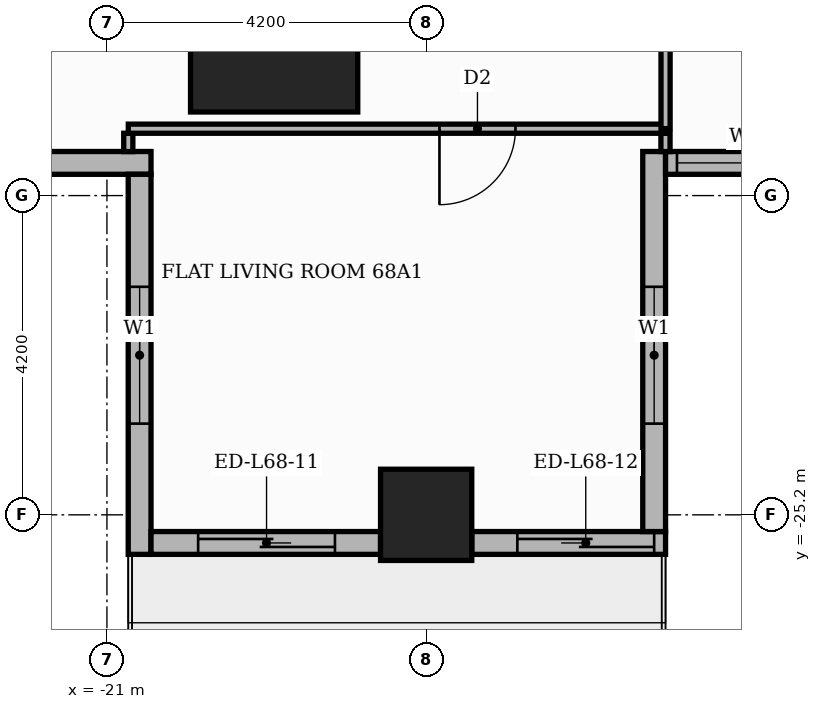
"""IFC4 building model, lengths in metres.
Left out: names, types, materials, properties, quantities, classifications, styles, units other than length and angle.
Written with IfcOpenShell. Run it as: python <this file> out.ifc"""

import sys

from ifc_helpers import new_model, si_unit, direction, frame, frame_2d, origin, origin_2d, place, context, subcontext, project, spatial, rectangle, extrude, element, fill, save


model = new_model("IFC4")
c1 = context("Model", 3, precision=1e-05, world=origin(), true_north=direction((0.0, 1.0)))
c2 = subcontext(c1, "Body", "Model", "MODEL_VIEW")
j1 = project(units=[si_unit("LENGTHUNIT", "METRE"), si_unit("PLANEANGLEUNIT", "RADIAN")], contexts=[c1])
p1 = place(None, origin())
s1 = spatial("IfcSite", under=j1, at=p1, CompositionType="ELEMENT")
p2 = place(p1, origin())
s2 = spatial("IfcBuilding", under=s1, at=p2, CompositionType="ELEMENT")
p3 = place(p2, frame((0.0, 0.0, 283.5)))
s3 = spatial("IfcBuildingStorey", under=s2, at=p3, CompositionType="ELEMENT", Elevation=283.5)
p4 = place(p3, frame((-18.8, -18.8, 0.0), z_axis=(0.0, 0.0, 1.0), x_axis=(1.0, 0.0, 0.0)))
e1 = element("IfcColumn", 1, at=p4, inside=s3, PredefinedType="COLUMN", context=c2, shape_type="SweptSolid", body=[
    extrude(rectangle(XDim=2.2, YDim=2.2, at=origin_2d()), origin(), (0.0, 0.0, 1.0), 3.9),
])
p5 = place(p3, frame((-16.8, -25.2, 0.0), z_axis=(0.0, 0.0, 1.0), x_axis=(1.0, 0.0, 0.0)))
e2 = element("IfcColumn", 2, at=p5, inside=s3, PredefinedType="COLUMN", context=c2, shape_type="SweptSolid", body=[
    extrude(rectangle(XDim=1.2, YDim=1.2, at=origin_2d()), origin(), (0.0, 0.0, 1.0), 3.9),
])
p6 = place(p3, frame((-25.42, -20.57, 0.0), z_axis=(0.0, 0.0, 1.0), x_axis=(1.0, 0.0, 0.0)))
e3 = element("IfcWall", 3, at=p6, inside=s3, PredefinedType="STANDARD", context=c2, shape_type="SweptSolid", body=[
    extrude(rectangle(XDim=5.0, YDim=0.3, at=frame_2d((2.5, 0.0))), origin(), (0.0, 0.0, 1.0), 3.4),
])
p7 = place(p6, frame((1.42, 0.0, 0.9)))
e4 = element("IfcOpeningElement", 4, at=p7, cuts=e3, PredefinedType="OPENING", context=c2, shape_type="SweptSolid", body=[
    extrude(rectangle(XDim=1.8, YDim=2.1, at=frame_2d((0.9, 1.05))), frame((0.0, 0.16, 0.0), z_axis=(0.0, -1.0, 0.0), x_axis=(1.0, 0.0, 0.0)), (0.0, 0.0, 1.0), 0.32),
])
p8 = place(p3, frame((-20.57, -20.72, 0.0), z_axis=(0.0, 0.0, 1.0), x_axis=(0.0, -1.0, 0.0)))
e5 = element("IfcWall", 5, at=p8, inside=s3, PredefinedType="STANDARD", context=c2, shape_type="SweptSolid", body=[
    extrude(rectangle(XDim=5.0, YDim=0.3, at=frame_2d((2.5, 0.0))), origin(), (0.0, 0.0, 1.0), 3.4),
])
p9 = place(p8, frame((1.48, 0.0, 0.9)))
e6 = element("IfcOpeningElement", 6, at=p9, cuts=e5, PredefinedType="OPENING", context=c2, shape_type="SweptSolid", body=[
    extrude(rectangle(XDim=1.8, YDim=2.1, at=frame_2d((0.9, 1.05))), frame((0.0, 0.16, 0.0), z_axis=(0.0, -1.0, 0.0), x_axis=(1.0, 0.0, 0.0)), (0.0, 0.0, 1.0), 0.32),
])
p10 = place(p3, frame((-20.42, -25.57, 0.0), z_axis=(0.0, 0.0, 1.0), x_axis=(1.0, 0.0, 0.0)))
e7 = element("IfcWall", 7, at=p10, inside=s3, PredefinedType="STANDARD", context=c2, shape_type="SweptSolid", body=[
    extrude(rectangle(XDim=3.02, YDim=0.3, at=frame_2d((1.51, 0.0))), origin(), (0.0, 0.0, 1.0), 3.4),
])
p11 = place(p10, frame((0.62, 0.0, 0.0)))
e8 = element("IfcOpeningElement", 8, at=p11, cuts=e7, PredefinedType="OPENING", context=c2, shape_type="SweptSolid", body=[
    extrude(rectangle(XDim=1.8, YDim=2.4, at=frame_2d((0.9, 1.2))), frame((0.0, 0.16, 0.0), z_axis=(0.0, -1.0, 0.0), x_axis=(1.0, 0.0, 0.0)), (0.0, 0.0, 1.0), 0.32),
])
p12 = place(p3, frame((-16.2, -25.57, 0.0), z_axis=(0.0, 0.0, 1.0), x_axis=(1.0, 0.0, 0.0)))
e9 = element("IfcWall", 9, at=p12, inside=s3, PredefinedType="STANDARD", context=c2, shape_type="SweptSolid", body=[
    extrude(rectangle(XDim=2.55, YDim=0.3, at=frame_2d((1.275, 0.0))), origin(), (0.0, 0.0, 1.0), 3.4),
])
p13 = place(p12, frame((0.6, 0.0, 0.0)))
e10 = element("IfcOpeningElement", 10, at=p13, cuts=e9, PredefinedType="OPENING", context=c2, shape_type="SweptSolid", body=[
    extrude(rectangle(XDim=1.8, YDim=2.4, at=frame_2d((0.9, 1.2))), frame((0.0, 0.16, 0.0), z_axis=(0.0, -1.0, 0.0), x_axis=(1.0, 0.0, 0.0)), (0.0, 0.0, 1.0), 0.32),
])
p14 = place(p3, frame((-13.8, -25.42, 0.0), z_axis=(0.0, 0.0, 1.0), x_axis=(0.0, 1.0, 0.0)))
e11 = element("IfcWall", 11, at=p14, inside=s3, PredefinedType="STANDARD", context=c2, shape_type="SweptSolid", body=[
    extrude(rectangle(XDim=5.0, YDim=0.3, at=frame_2d((2.5, 0.0))), origin(), (0.0, 0.0, 1.0), 3.4),
])
p15 = place(p14, frame((1.42, 0.0, 0.9)))
e12 = element("IfcOpeningElement", 12, at=p15, cuts=e11, PredefinedType="OPENING", context=c2, shape_type="SweptSolid", body=[
    extrude(rectangle(XDim=1.8, YDim=2.1, at=frame_2d((0.9, 1.05))), frame((0.0, 0.16, 0.0), z_axis=(0.0, -1.0, 0.0), x_axis=(1.0, 0.0, 0.0)), (0.0, 0.0, 1.0), 0.32),
])
p16 = place(p3, frame((-13.65, -20.57, 0.0), z_axis=(0.0, 0.0, 1.0), x_axis=(1.0, 0.0, 0.0)))
e13 = element("IfcWall", 13, at=p16, inside=s3, PredefinedType="STANDARD", context=c2, shape_type="SweptSolid", body=[
    extrude(rectangle(XDim=27.6, YDim=0.3, at=frame_2d((13.8, 0.0))), origin(), (0.0, 0.0, 1.0), 3.4),
])
p17 = place(p16, frame((0.15, 0.0, 0.9)))
e14 = element("IfcOpeningElement", 14, at=p17, cuts=e13, PredefinedType="OPENING", context=c2, shape_type="SweptSolid", body=[
    extrude(rectangle(XDim=1.8, YDim=2.1, at=frame_2d((0.9, 1.05))), frame((0.0, 0.16, 0.0), z_axis=(0.0, -1.0, 0.0), x_axis=(1.0, 0.0, 0.0)), (0.0, 0.0, 1.0), 0.32),
])
p18 = place(p16, frame((2.25, 0.0, 0.9)))
e15 = element("IfcOpeningElement", 15, at=p18, cuts=e13, PredefinedType="OPENING", context=c2, shape_type="SweptSolid", body=[
    extrude(rectangle(XDim=6.0, YDim=2.1, at=frame_2d((3.0, 1.05))), frame((0.0, 0.16, 0.0), z_axis=(0.0, -1.0, 0.0), x_axis=(1.0, 0.0, 0.0)), (0.0, 0.0, 1.0), 0.32),
])
p19 = place(p16, frame((8.55, 0.0, 0.9)))
e16 = element("IfcOpeningElement", 16, at=p19, cuts=e13, PredefinedType="OPENING", context=c2, shape_type="SweptSolid", body=[
    extrude(rectangle(XDim=6.0, YDim=2.1, at=frame_2d((3.0, 1.05))), frame((0.0, 0.16, 0.0), z_axis=(0.0, -1.0, 0.0), x_axis=(1.0, 0.0, 0.0)), (0.0, 0.0, 1.0), 0.32),
])
p20 = place(p16, frame((14.85, 0.0, 0.9)))
e17 = element("IfcOpeningElement", 17, at=p20, cuts=e13, PredefinedType="OPENING", context=c2, shape_type="SweptSolid", body=[
    extrude(rectangle(XDim=6.0, YDim=2.1, at=frame_2d((3.0, 1.05))), frame((0.0, 0.16, 0.0), z_axis=(0.0, -1.0, 0.0), x_axis=(1.0, 0.0, 0.0)), (0.0, 0.0, 1.0), 0.32),
])
p21 = place(p16, frame((21.15, 0.0, 0.9)))
e18 = element("IfcOpeningElement", 18, at=p21, cuts=e13, PredefinedType="OPENING", context=c2, shape_type="SweptSolid", body=[
    extrude(rectangle(XDim=6.0, YDim=2.1, at=frame_2d((3.0, 1.05))), frame((0.0, 0.16, 0.0), z_axis=(0.0, -1.0, 0.0), x_axis=(1.0, 0.0, 0.0)), (0.0, 0.0, 1.0), 0.32),
])
for number, where, z_axis, x_axis in (
    (19, (-20.719, -20.421, 0.0), (0.0, 0.0, 1.0), (0.0, 1.0, 0.0)),
    (20, (-13.651, -20.421, 0.0), (0.0, 0.0, 1.0), (0.0, 1.0, 0.0)),
):
    element("IfcWall", number, at=place(p3, frame(where, z_axis=z_axis, x_axis=x_axis)), inside=s3, PredefinedType="PARTITIONING", context=c2, shape_type="SweptSolid", body=[
        extrude(rectangle(XDim=0.241, YDim=0.12, at=frame_2d((0.121, 0.0))), origin(), (0.0, 0.0, 1.0), 3.4),
    ])
p22 = place(p3, frame((-20.719, -20.12, 0.0), z_axis=(0.0, 0.0, 1.0), x_axis=(1.0, 0.0, 0.0)))
e21 = element("IfcWall", 21, at=p22, inside=s3, PredefinedType="PARTITIONING", context=c2, shape_type="SweptSolid", body=[
    extrude(rectangle(XDim=7.068, YDim=0.12, at=frame_2d((3.534, 0.0))), origin(), (0.0, 0.0, 1.0), 3.4),
])
p23 = place(p22, frame((4.094, 0.0, 0.0)))
e22 = element("IfcOpeningElement", 22, at=p23, cuts=e21, PredefinedType="OPENING", context=c2, shape_type="SweptSolid", body=[
    extrude(rectangle(XDim=1.0, YDim=2.1, at=frame_2d((0.5, 1.05))), frame((0.0, 0.07, 0.0), z_axis=(0.0, -1.0, 0.0), x_axis=(1.0, 0.0, 0.0)), (0.0, 0.0, 1.0), 0.14),
])
p24 = place(p3, frame((-13.65, -20.119, 0.0), z_axis=(0.0, 0.0, 1.0), x_axis=(0.0, 1.0, 0.0)))
e23 = element("IfcWall", 23, at=p24, inside=s3, PredefinedType="PARTITIONING", context=c2, shape_type="SweptSolid", body=[
    extrude(rectangle(XDim=6.369, YDim=0.12, at=frame_2d((3.185, 0.0))), origin(), (0.0, 0.0, 1.0), 3.4),
])
p25 = place(p24, frame((2.784, 0.0, 0.0)))
e24 = element("IfcOpeningElement", 24, at=p25, cuts=e23, PredefinedType="OPENING", context=c2, shape_type="SweptSolid", body=[
    extrude(rectangle(XDim=0.9, YDim=2.1, at=frame_2d((0.45, 1.05))), frame((0.0, 0.07, 0.0), z_axis=(0.0, -1.0, 0.0), x_axis=(1.0, 0.0, 0.0)), (0.0, 0.0, 1.0), 0.14),
])
p26 = place(p9, origin())
e25 = element("IfcWindow", 25, at=p26, inside=s3, PartitioningType="SINGLE_PANEL", PredefinedType="WINDOW", context=c2, shape_type="SweptSolid", body=[
    extrude(rectangle(XDim=1.8, YDim=2.1, at=frame_2d((0.9, 1.05))), frame((0.0, 0.03, 0.0), z_axis=(0.0, -1.0, 0.0), x_axis=(1.0, 0.0, 0.0)), (0.0, 0.0, 1.0), 0.06),
])
fill(e6, e25)
p27 = place(p11, origin())
e26 = element("IfcDoor", 26, at=p27, inside=s3, OperationType="SLIDING_TO_RIGHT", PredefinedType="DOOR", context=c2, shape_type="SweptSolid", body=[
    extrude(rectangle(XDim=1.8, YDim=2.4, at=frame_2d((0.9, 1.2))), frame((0.0, 0.025, 0.0), z_axis=(0.0, -1.0, 0.0), x_axis=(1.0, 0.0, 0.0)), (0.0, 0.0, 1.0), 0.05),
])
fill(e8, e26)
p28 = place(p13, origin())
e27 = element("IfcDoor", 27, at=p28, inside=s3, OperationType="SLIDING_TO_LEFT", PredefinedType="DOOR", context=c2, shape_type="SweptSolid", body=[
    extrude(rectangle(XDim=1.8, YDim=2.4, at=frame_2d((0.9, 1.2))), frame((0.0, 0.025, 0.0), z_axis=(0.0, -1.0, 0.0), x_axis=(1.0, 0.0, 0.0)), (0.0, 0.0, 1.0), 0.05),
])
fill(e10, e27)
p29 = place(p15, origin())
e28 = element("IfcWindow", 28, at=p29, inside=s3, PartitioningType="SINGLE_PANEL", PredefinedType="WINDOW", context=c2, shape_type="SweptSolid", body=[
    extrude(rectangle(XDim=1.8, YDim=2.1, at=frame_2d((0.9, 1.05))), frame((0.0, 0.03, 0.0), z_axis=(0.0, -1.0, 0.0), x_axis=(1.0, 0.0, 0.0)), (0.0, 0.0, 1.0), 0.06),
])
fill(e12, e28)
p30 = place(p17, origin())
e29 = element("IfcWindow", 29, at=p30, inside=s3, PartitioningType="SINGLE_PANEL", PredefinedType="WINDOW", context=c2, shape_type="SweptSolid", body=[
    extrude(rectangle(XDim=1.8, YDim=2.1, at=frame_2d((0.9, 1.05))), frame((0.0, 0.03, 0.0), z_axis=(0.0, -1.0, 0.0), x_axis=(1.0, 0.0, 0.0)), (0.0, 0.0, 1.0), 0.06),
])
fill(e14, e29)
p31 = place(p23, frame((1.0, 0.0, 0.0), z_axis=(0.0, 0.0, 1.0), x_axis=(-1.0, 0.0, 0.0)))
e30 = element("IfcDoor", 30, at=p31, inside=s3, OperationType="SINGLE_SWING_LEFT", PredefinedType="DOOR", context=c2, shape_type="SweptSolid", body=[
    extrude(rectangle(XDim=1.0, YDim=2.1, at=frame_2d((0.5, 1.05))), frame((0.0, 0.025, 0.0), z_axis=(0.0, -1.0, 0.0), x_axis=(1.0, 0.0, 0.0)), (0.0, 0.0, 1.0), 0.05),
])
fill(e22, e30)
save(model, sys.argv[1])
